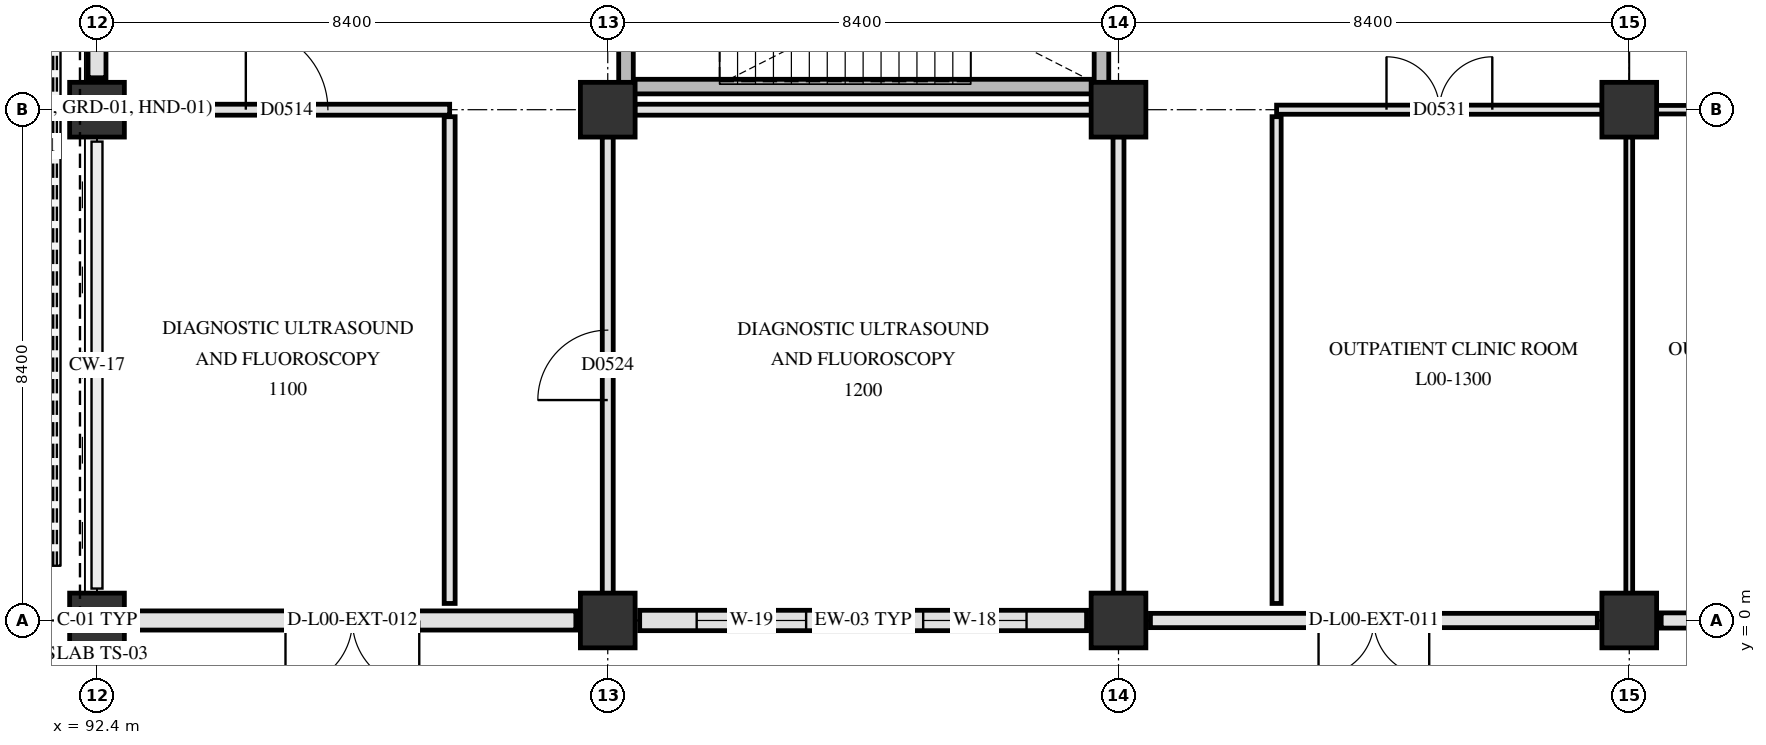
"""IFC4 building model, lengths in metres.
Left out: names, types, materials, properties, quantities, classifications, styles, units other than length and angle.
Written with IfcOpenShell. Run it as: python <this file> out.ifc"""

import sys

from ifc_helpers import new_model, si_unit, direction, frame, frame_2d, origin, origin_2d, place, context, subcontext, project, spatial, rectangle, extrude, element, fill, save


model = new_model("IFC4")
c1 = context("Model", 3, precision=1e-05, world=origin(), true_north=direction((0.0, 1.0)))
c2 = subcontext(c1, "Body", "Model", "MODEL_VIEW")
j1 = project(units=[si_unit("LENGTHUNIT", "METRE"), si_unit("PLANEANGLEUNIT", "RADIAN")], contexts=[c1])
p1 = place(None, origin())
s1 = spatial("IfcSite", under=j1, at=p1, CompositionType="ELEMENT")
p2 = place(p1, origin())
s2 = spatial("IfcBuilding", under=s1, at=p2, CompositionType="ELEMENT")
p3 = place(p2, origin())
s3 = spatial("IfcBuildingStorey", under=s2, at=p3, CompositionType="ELEMENT", Elevation=0.0)
for number, where, z_axis, x_axis in (
    (1, (92.4, 0.0, 0.0), (0.0, 0.0, 1.0), (1.0, 0.0, 0.0)),
    (2, (92.4, 8.4, 0.0), (0.0, 0.0, 1.0), (1.0, 0.0, 0.0)),
    (3, (100.8, 0.0, 0.0), (0.0, 0.0, 1.0), (1.0, 0.0, 0.0)),
    (4, (100.8, 8.4, 0.0), (0.0, 0.0, 1.0), (1.0, 0.0, 0.0)),
    (5, (109.2, 0.0, 0.0), (0.0, 0.0, 1.0), (1.0, 0.0, 0.0)),
    (6, (109.2, 8.4, 0.0), (0.0, 0.0, 1.0), (1.0, 0.0, 0.0)),
    (7, (117.6, 0.0, 0.0), (0.0, 0.0, 1.0), (1.0, 0.0, 0.0)),
    (8, (117.6, 8.4, 0.0), (0.0, 0.0, 1.0), (1.0, 0.0, 0.0)),
):
    element("IfcColumn", number, at=place(p3, frame(where, z_axis=z_axis, x_axis=x_axis)), inside=s3, PredefinedType="COLUMN", context=c2, shape_type="SweptSolid", body=[
        extrude(rectangle(XDim=0.9, YDim=0.9, at=origin_2d()), origin(), (0.0, 0.0, 1.0), 4.8),
    ])
p4 = place(p3, frame((125.475, 0.0, 0.0), z_axis=(0.0, 0.0, 1.0), x_axis=(-1.0, 0.0, 0.0)))
e9 = element("IfcWall", 9, at=p4, inside=s3, PredefinedType="SOLIDWALL", context=c2, shape_type="SweptSolid", body=[
    extrude(rectangle(XDim=7.35, YDim=0.25, at=frame_2d((3.675, 0.0))), origin(), (0.0, 0.0, 1.0), 3.79),
])
p5 = place(p4, frame((2.575, 0.0, 0.0)))
e10 = element("IfcOpeningElement", 10, at=p5, cuts=e9, PredefinedType="OPENING", context=c2, shape_type="SweptSolid", body=[
    extrude(rectangle(XDim=2.2, YDim=2.35, at=frame_2d((1.1, 1.175))), frame((0.0, 0.135, 0.0), z_axis=(0.0, -1.0, 0.0), x_axis=(1.0, 0.0, 0.0)), (0.0, 0.0, 1.0), 0.27),
])
p6 = place(p3, frame((117.075, 0.0, 0.0), z_axis=(0.0, 0.0, 1.0), x_axis=(-1.0, 0.0, 0.0)))
e11 = element("IfcWall", 11, at=p6, inside=s3, PredefinedType="SOLIDWALL", context=c2, shape_type="SweptSolid", body=[
    extrude(rectangle(XDim=7.35, YDim=0.235, at=frame_2d((3.675, 0.0))), origin(), (0.0, 0.0, 1.0), 3.79),
])
p7 = place(p6, frame((2.765, 0.0, 0.0)))
e12 = element("IfcOpeningElement", 12, at=p7, cuts=e11, PredefinedType="OPENING", context=c2, shape_type="SweptSolid", body=[
    extrude(rectangle(XDim=1.82, YDim=2.28, at=frame_2d((0.91, 1.14))), frame((0.0, 0.127, 0.0), z_axis=(0.0, -1.0, 0.0), x_axis=(1.0, 0.0, 0.0)), (0.0, 0.0, 1.0), 0.255),
])
p8 = place(p3, frame((108.675, 0.0, 0.0), z_axis=(0.0, 0.0, 1.0), x_axis=(-1.0, 0.0, 0.0)))
e13 = element("IfcWall", 13, at=p8, inside=s3, PredefinedType="SOLIDWALL", context=c2, shape_type="SweptSolid", body=[
    extrude(rectangle(XDim=7.35, YDim=0.335, at=frame_2d((3.675, 0.0))), origin(), (0.0, 0.0, 1.0), 3.79),
])
p9 = place(p8, frame((0.988, 0.0, 0.85)))
e14 = element("IfcOpeningElement", 14, at=p9, cuts=e13, PredefinedType="OPENING", context=c2, shape_type="SweptSolid", body=[
    extrude(rectangle(XDim=1.7, YDim=1.42, at=frame_2d((0.85, 0.71))), frame((0.0, 0.177, 0.0), z_axis=(0.0, -1.0, 0.0), x_axis=(1.0, 0.0, 0.0)), (0.0, 0.0, 1.0), 0.355),
])
p10 = place(p8, frame((4.613, 0.0, 0.85)))
e15 = element("IfcOpeningElement", 15, at=p10, cuts=e13, PredefinedType="OPENING", context=c2, shape_type="SweptSolid", body=[
    extrude(rectangle(XDim=1.8, YDim=1.42, at=frame_2d((0.9, 0.71))), frame((0.0, 0.177, 0.0), z_axis=(0.0, -1.0, 0.0), x_axis=(1.0, 0.0, 0.0)), (0.0, 0.0, 1.0), 0.355),
])
p11 = place(p3, frame((100.275, 0.0, 0.0), z_axis=(0.0, 0.0, 1.0), x_axis=(-1.0, 0.0, 0.0)))
e16 = element("IfcWall", 16, at=p11, inside=s3, PredefinedType="SOLIDWALL", context=c2, shape_type="SweptSolid", body=[
    extrude(rectangle(XDim=7.35, YDim=0.315, at=frame_2d((3.675, 0.0))), origin(), (0.0, 0.0, 1.0), 3.79),
])
p12 = place(p11, frame((2.575, 0.0, 0.0)))
e17 = element("IfcOpeningElement", 17, at=p12, cuts=e16, PredefinedType="OPENING", context=c2, shape_type="SweptSolid", body=[
    extrude(rectangle(XDim=2.2, YDim=2.35, at=frame_2d((1.1, 1.175))), frame((0.0, 0.167, 0.0), z_axis=(0.0, -1.0, 0.0), x_axis=(1.0, 0.0, 0.0)), (0.0, 0.0, 1.0), 0.335),
])
p13 = place(p3, frame((92.4, 8.925, 0.0), z_axis=(0.0, 0.0, 1.0), x_axis=(0.0, 1.0, 0.0)))
e18 = element("IfcWall", 18, at=p13, inside=s3, PredefinedType="SOLIDWALL", context=c2, shape_type="SweptSolid", body=[
    extrude(rectangle(XDim=7.546, YDim=0.295, at=frame_2d((3.773, 0.0))), origin(), (0.0, 0.0, 1.0), 3.79),
])
p14 = place(p13, frame((0.937, 0.0, 0.85)))
e19 = element("IfcOpeningElement", 19, at=p14, cuts=e18, PredefinedType="OPENING", context=c2, shape_type="SweptSolid", body=[
    extrude(rectangle(XDim=1.9, YDim=1.42, at=frame_2d((0.95, 0.71))), frame((0.0, 0.157, 0.0), z_axis=(0.0, -1.0, 0.0), x_axis=(1.0, 0.0, 0.0)), (0.0, 0.0, 1.0), 0.315),
])
p15 = place(p13, frame((5.135, 0.0, 0.85)))
e20 = element("IfcOpeningElement", 20, at=p15, cuts=e18, PredefinedType="OPENING", context=c2, shape_type="SweptSolid", body=[
    extrude(rectangle(XDim=1.05, YDim=1.54, at=frame_2d((0.525, 0.77))), frame((0.0, 0.157, 0.0), z_axis=(0.0, -1.0, 0.0), x_axis=(1.0, 0.0, 0.0)), (0.0, 0.0, 1.0), 0.315),
])
p16 = place(p3, frame((101.1, 8.78, 0.0), z_axis=(0.0, 0.0, 1.0), x_axis=(1.0, 0.0, 0.0)))
e21 = element("IfcWall", 21, at=p16, inside=s3, PredefinedType="SHEAR", context=c2, shape_type="SweptSolid", body=[
    extrude(rectangle(XDim=7.82, YDim=0.24, at=frame_2d((3.91, 0.0))), origin(), (0.0, 0.0, 1.0), 4.5),
])
for number, where, z_axis, x_axis in (
    (22, (101.1, 8.78, 0.0), (0.0, 0.0, 1.0), (0.0, 1.0, 0.0)),
    (23, (108.92, 8.78, 0.0), (0.0, 0.0, 1.0), (0.0, 1.0, 0.0)),
):
    element("IfcWall", number, at=place(p3, frame(where, z_axis=z_axis, x_axis=x_axis)), inside=s3, PredefinedType="SHEAR", context=c2, shape_type="SweptSolid", body=[
        extrude(rectangle(XDim=3.32, YDim=0.24, at=frame_2d((1.66, 0.0))), origin(), (0.0, 0.0, 1.0), 4.5),
    ])
p17 = place(p3, frame((92.845, 8.4, 0.0), z_axis=(0.0, 0.0, 1.0), x_axis=(1.0, 0.0, 0.0)))
e24 = element("IfcWall", 24, at=p17, inside=s3, PredefinedType="PARTITIONING", context=c2, shape_type="SweptSolid", body=[
    extrude(rectangle(XDim=5.355, YDim=0.18, at=frame_2d((2.677, 0.0))), origin(), (0.0, 0.0, 1.0), 3.84),
])
p18 = place(p17, frame((2.002, 0.0, 0.0)))
e25 = element("IfcOpeningElement", 25, at=p18, cuts=e24, PredefinedType="OPENING", context=c2, shape_type="SweptSolid", body=[
    extrude(rectangle(XDim=1.35, YDim=2.2, at=frame_2d((0.675, 1.1))), frame((0.0, 0.1, 0.0), z_axis=(0.0, -1.0, 0.0), x_axis=(1.0, 0.0, 0.0)), (0.0, 0.0, 1.0), 0.2),
])
p19 = place(p3, frame((101.245, 8.4, 0.0), z_axis=(0.0, 0.0, 1.0), x_axis=(1.0, 0.0, 0.0)))
e26 = element("IfcWall", 26, at=p19, inside=s3, PredefinedType="PARTITIONING", context=c2, shape_type="SweptSolid", body=[
    extrude(rectangle(XDim=7.51, YDim=0.18, at=frame_2d((3.755, 0.0))), origin(), (0.0, 0.0, 1.0), 3.84),
])
p20 = place(p3, frame((111.8, 8.4, 0.0), z_axis=(0.0, 0.0, 1.0), x_axis=(1.0, 0.0, 0.0)))
e27 = element("IfcWall", 27, at=p20, inside=s3, PredefinedType="PARTITIONING", context=c2, shape_type="SweptSolid", body=[
    extrude(rectangle(XDim=5.355, YDim=0.15, at=frame_2d((2.677, 0.0))), origin(), (0.0, 0.0, 1.0), 3.84),
])
p21 = place(p20, frame((1.808, 0.0, 0.0)))
e28 = element("IfcOpeningElement", 28, at=p21, cuts=e27, PredefinedType="OPENING", context=c2, shape_type="SweptSolid", body=[
    extrude(rectangle(XDim=1.74, YDim=2.24, at=frame_2d((0.87, 1.12))), frame((0.0, 0.085, 0.0), z_axis=(0.0, -1.0, 0.0), x_axis=(1.0, 0.0, 0.0)), (0.0, 0.0, 1.0), 0.17),
])
p22 = place(p3, frame((118.045, 8.4, 0.0), z_axis=(0.0, 0.0, 1.0), x_axis=(1.0, 0.0, 0.0)))
e29 = element("IfcWall", 29, at=p22, inside=s3, PredefinedType="PARTITIONING", context=c2, shape_type="SweptSolid", body=[
    extrude(rectangle(XDim=7.51, YDim=0.14, at=frame_2d((3.755, 0.0))), origin(), (0.0, 0.0, 1.0), 3.84),
])
p23 = place(p22, frame((2.965, 0.0, 0.0)))
e30 = element("IfcOpeningElement", 30, at=p23, cuts=e29, PredefinedType="OPENING", context=c2, shape_type="SweptSolid", body=[
    extrude(rectangle(XDim=1.58, YDim=2.22, at=frame_2d((0.79, 1.11))), frame((0.0, 0.08, 0.0), z_axis=(0.0, -1.0, 0.0), x_axis=(1.0, 0.0, 0.0)), (0.0, 0.0, 1.0), 0.16),
])
p24 = place(p3, frame((98.2, 0.28, 0.0), z_axis=(0.0, 0.0, 1.0), x_axis=(0.0, 1.0, 0.0)))
e31 = element("IfcWall", 31, at=p24, inside=s3, PredefinedType="PARTITIONING", context=c2, shape_type="SweptSolid", body=[
    extrude(rectangle(XDim=8.005, YDim=0.18, at=frame_2d((4.002, 0.0))), origin(), (0.0, 0.0, 1.0), 3.84),
])
p25 = place(p3, frame((100.8, 0.445, 0.0), z_axis=(0.0, 0.0, 1.0), x_axis=(0.0, 1.0, 0.0)))
e32 = element("IfcWall", 32, at=p25, inside=s3, PredefinedType="PARTITIONING", context=c2, shape_type="SweptSolid", body=[
    extrude(rectangle(XDim=7.51, YDim=0.18, at=frame_2d((3.755, 0.0))), origin(), (0.0, 0.0, 1.0), 3.89),
])
p26 = place(p25, frame((3.18, 0.0, 0.0)))
e33 = element("IfcOpeningElement", 33, at=p26, cuts=e32, PredefinedType="OPENING", context=c2, shape_type="SweptSolid", body=[
    extrude(rectangle(XDim=1.15, YDim=2.15, at=frame_2d((0.575, 1.075))), frame((0.0, 0.1, 0.0), z_axis=(0.0, -1.0, 0.0), x_axis=(1.0, 0.0, 0.0)), (0.0, 0.0, 1.0), 0.2),
])
p27 = place(p3, frame((109.2, 0.445, 0.0), z_axis=(0.0, 0.0, 1.0), x_axis=(0.0, 1.0, 0.0)))
e34 = element("IfcWall", 34, at=p27, inside=s3, PredefinedType="PARTITIONING", context=c2, shape_type="SweptSolid", body=[
    extrude(rectangle(XDim=7.51, YDim=0.18, at=frame_2d((3.755, 0.0))), origin(), (0.0, 0.0, 1.0), 3.89),
])
p28 = place(p3, frame((111.8, 0.28, 0.0), z_axis=(0.0, 0.0, 1.0), x_axis=(0.0, 1.0, 0.0)))
e35 = element("IfcWall", 35, at=p28, inside=s3, PredefinedType="PARTITIONING", context=c2, shape_type="SweptSolid", body=[
    extrude(rectangle(XDim=8.005, YDim=0.15, at=frame_2d((4.002, 0.0))), origin(), (0.0, 0.0, 1.0), 3.84),
])
p29 = place(p3, frame((117.6, 0.445, 0.0), z_axis=(0.0, 0.0, 1.0), x_axis=(0.0, 1.0, 0.0)))
e36 = element("IfcWall", 36, at=p29, inside=s3, PredefinedType="PARTITIONING", context=c2, shape_type="SweptSolid", body=[
    extrude(rectangle(XDim=7.51, YDim=0.112, at=frame_2d((3.755, 0.0))), origin(), (0.0, 0.0, 1.0), 3.89),
])
p30 = place(p7, origin())
e37 = element("IfcDoor", 37, at=p30, inside=s3, OperationType="DOUBLE_SWING_LEFT", PredefinedType="DOOR", context=c2, shape_type="SweptSolid", body=[
    extrude(rectangle(XDim=1.82, YDim=2.28, at=frame_2d((0.91, 1.14))), frame((0.0, 0.025, 0.0), z_axis=(0.0, -1.0, 0.0), x_axis=(1.0, 0.0, 0.0)), (0.0, 0.0, 1.0), 0.05),
])
fill(e12, e37)
p31 = place(p9, origin())
e38 = element("IfcWindow", 38, at=p31, inside=s3, PartitioningType="SINGLE_PANEL", PredefinedType="WINDOW", context=c2, shape_type="SweptSolid", body=[
    extrude(rectangle(XDim=1.7, YDim=1.42, at=frame_2d((0.85, 0.71))), frame((0.0, 0.03, 0.0), z_axis=(0.0, -1.0, 0.0), x_axis=(1.0, 0.0, 0.0)), (0.0, 0.0, 1.0), 0.06),
])
fill(e14, e38)
p32 = place(p10, origin())
e39 = element("IfcWindow", 39, at=p32, inside=s3, PartitioningType="SINGLE_PANEL", PredefinedType="WINDOW", context=c2, shape_type="SweptSolid", body=[
    extrude(rectangle(XDim=1.8, YDim=1.42, at=frame_2d((0.9, 0.71))), frame((0.0, 0.03, 0.0), z_axis=(0.0, -1.0, 0.0), x_axis=(1.0, 0.0, 0.0)), (0.0, 0.0, 1.0), 0.06),
])
fill(e15, e39)
p33 = place(p12, origin())
e40 = element("IfcDoor", 40, at=p33, inside=s3, OperationType="DOUBLE_SWING_LEFT", PredefinedType="DOOR", context=c2, shape_type="SweptSolid", body=[
    extrude(rectangle(XDim=2.2, YDim=2.35, at=frame_2d((1.1, 1.175))), frame((0.0, 0.025, 0.0), z_axis=(0.0, -1.0, 0.0), x_axis=(1.0, 0.0, 0.0)), (0.0, 0.0, 1.0), 0.05),
])
fill(e17, e40)
p34 = place(p18, origin())
e41 = element("IfcDoor", 41, at=p34, inside=s3, OperationType="SINGLE_SWING_LEFT", PredefinedType="DOOR", context=c2, shape_type="SweptSolid", body=[
    extrude(rectangle(XDim=1.35, YDim=2.2, at=frame_2d((0.675, 1.1))), frame((0.0, 0.025, 0.0), z_axis=(0.0, -1.0, 0.0), x_axis=(1.0, 0.0, 0.0)), (0.0, 0.0, 1.0), 0.05),
])
fill(e25, e41)
p35 = place(p26, origin())
e42 = element("IfcDoor", 42, at=p35, inside=s3, OperationType="SINGLE_SWING_LEFT", PredefinedType="DOOR", context=c2, shape_type="SweptSolid", body=[
    extrude(rectangle(XDim=1.15, YDim=2.15, at=frame_2d((0.575, 1.075))), frame((0.0, 0.025, 0.0), z_axis=(0.0, -1.0, 0.0), x_axis=(1.0, 0.0, 0.0)), (0.0, 0.0, 1.0), 0.05),
])
fill(e33, e42)
p36 = place(p21, origin())
e43 = element("IfcDoor", 43, at=p36, inside=s3, OperationType="DOUBLE_SWING_RIGHT", PredefinedType="DOOR", context=c2, shape_type="SweptSolid", body=[
    extrude(rectangle(XDim=1.74, YDim=2.24, at=frame_2d((0.87, 1.12))), frame((0.0, 0.025, 0.0), z_axis=(0.0, -1.0, 0.0), x_axis=(1.0, 0.0, 0.0)), (0.0, 0.0, 1.0), 0.05),
])
fill(e28, e43)
save(model, sys.argv[1])
